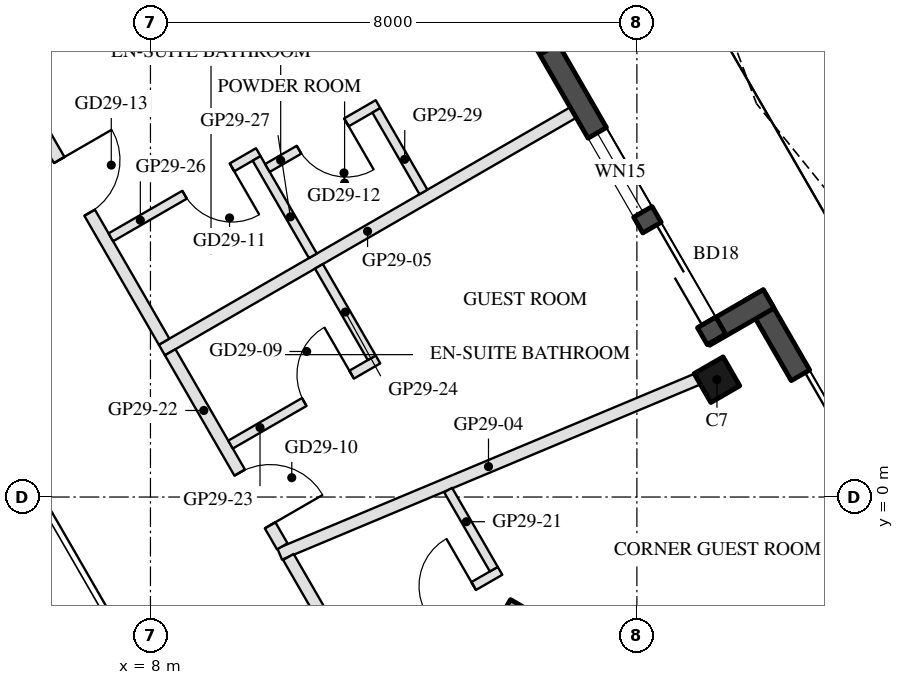
"""IFC4 building model, lengths in metres.
Left out: names, types, materials, properties, quantities, classifications, styles, units other than length and angle.
Written with IfcOpenShell. Run it as: python <this file> out.ifc"""

import sys

from ifc_helpers import new_model, si_unit, direction, frame, frame_2d, origin, origin_2d, place, context, subcontext, project, spatial, rectangle, hollow_rectangle, extrude, boolean, halfspace, element, fill, save


model = new_model("IFC4")
c1 = context("Model", 3, precision=1e-05, world=origin(), true_north=direction((0.0, 1.0)))
c2 = subcontext(c1, "Body", "Model", "MODEL_VIEW")
j1 = project(units=[si_unit("LENGTHUNIT", "METRE"), si_unit("PLANEANGLEUNIT", "RADIAN")], contexts=[c1])
p1 = place(None, origin())
s1 = spatial("IfcSite", under=j1, at=p1, CompositionType="ELEMENT")
p2 = place(p1, origin())
s2 = spatial("IfcBuilding", under=s1, at=p2, CompositionType="ELEMENT")
p3 = place(p2, frame((0.0, 0.0, 294.8)))
s3 = spatial("IfcBuildingStorey", under=s2, at=p3, CompositionType="ELEMENT", Elevation=294.8)
p4 = place(p3, frame((17.317, 1.93, 0.0), z_axis=(0.0, 0.0, 1.0), x_axis=(-0.5, 0.866025403784, 0.0)))
e1 = element("IfcColumn", 1, at=p4, inside=s3, PredefinedType="COLUMN", context=c2, shape_type="SweptSolid", body=[
    boolean("DIFFERENCE", extrude(hollow_rectangle(XDim=0.55, YDim=0.55, WallThickness=0.025, at=origin_2d()), origin(), (0.0, 0.0, 1.0), 3.7), halfspace(frame((0.0, 0.0, 3.666), z_axis=(0.0, 0.0, 1.0), x_axis=(1.0, 0.0, 0.0)), False)),
])
p5 = place(p3, frame((23.205, -5.819, 0.0), z_axis=(0.0, 0.0, 1.0), x_axis=(-0.500010118922, 0.866019561543, 0.0)))
e2 = element("IfcWall", 2, at=p5, inside=s3, PredefinedType="SOLIDWALL", context=c2, shape_type="SweptSolid", body=[
    extrude(rectangle(XDim=10.554, YDim=0.35, at=frame_2d((5.277, 0.0))), origin(), (0.0, 0.0, 1.0), 3.55),
])
p6 = place(p5, frame((0.566, 0.0, 0.3)))
e3 = element("IfcOpeningElement", 3, at=p6, cuts=e2, PredefinedType="OPENING", context=c2, shape_type="SweptSolid", body=[
    extrude(rectangle(XDim=1.4, YDim=2.65, at=frame_2d((0.7, 1.325))), frame((0.0, 0.185, 0.0), z_axis=(0.0, -1.0, 0.0), x_axis=(1.0, 0.0, 0.0)), (0.0, 0.0, 1.0), 0.37),
])
p7 = place(p5, frame((6.63, 0.0, 0.0)))
e4 = element("IfcOpeningElement", 4, at=p7, cuts=e2, PredefinedType="OPENING", context=c2, shape_type="SweptSolid", body=[
    extrude(rectangle(XDim=2.4, YDim=2.4, at=frame_2d((1.2, 1.2))), frame((0.0, 0.185, 0.0), z_axis=(0.0, -1.0, 0.0), x_axis=(1.0, 0.0, 0.0)), (0.0, 0.0, 1.0), 0.37),
])
p8 = place(p5, frame((3.292, 0.0, 0.3)))
e5 = element("IfcOpeningElement", 5, at=p8, cuts=e2, PredefinedType="OPENING", context=c2, shape_type="SweptSolid", body=[
    extrude(rectangle(XDim=3.0, YDim=2.65, at=frame_2d((1.5, 1.325))), frame((0.0, 0.185, 0.0), z_axis=(0.0, -1.0, 0.0), x_axis=(1.0, 0.0, 0.0)), (0.0, 0.0, 1.0), 0.37),
])
p9 = place(p3, frame((18.167, 3.258, 0.0), z_axis=(0.0, 0.0, 1.0), x_axis=(-0.866005645448, -0.500034220881, 0.0)))
e6 = element("IfcWall", 6, at=p9, inside=s3, PredefinedType="SOLIDWALL", context=c2, shape_type="SweptSolid", body=[
    extrude(rectangle(XDim=1.22, YDim=0.35, at=frame_2d((0.61, 0.0))), origin(), (0.0, 0.0, 1.0), 3.55),
])
p10 = place(p3, frame((17.308, 2.595, 0.0), z_axis=(0.0, 0.0, 1.0), x_axis=(-0.500005339912, 0.866022320763, 0.0)))
e7 = element("IfcWall", 7, at=p10, inside=s3, PredefinedType="SOLIDWALL", context=c2, shape_type="SweptSolid", body=[
    extrude(rectangle(XDim=5.827, YDim=0.35, at=frame_2d((2.914, 0.0))), origin(), (0.0, 0.0, 1.0), 3.55),
])
p11 = place(p10, frame((0.32, 0.0, 0.0)))
e8 = element("IfcOpeningElement", 8, at=p11, cuts=e7, PredefinedType="OPENING", context=c2, shape_type="SweptSolid", body=[
    extrude(rectangle(XDim=1.8, YDim=2.4, at=frame_2d((0.9, 1.2))), frame((0.0, 0.185, 0.0), z_axis=(0.0, -1.0, 0.0), x_axis=(1.0, 0.0, 0.0)), (0.0, 0.0, 1.0), 0.37),
])
p12 = place(p10, frame((2.42, 0.0, 0.3)))
e9 = element("IfcOpeningElement", 9, at=p12, cuts=e7, PredefinedType="OPENING", context=c2, shape_type="SweptSolid", body=[
    extrude(rectangle(XDim=1.5, YDim=2.65, at=frame_2d((0.75, 1.325))), frame((0.0, 0.185, 0.0), z_axis=(0.0, -1.0, 0.0), x_axis=(1.0, 0.0, 0.0)), (0.0, 0.0, 1.0), 0.37),
])
p13 = place(p3, frame((14.342, 7.443, 0.0), z_axis=(0.0, 0.0, 1.0), x_axis=(0.866092288191, 0.499884134912, 0.0)))
e10 = element("IfcWall", 10, at=p13, inside=s3, PredefinedType="SOLIDWALL", context=c2, shape_type="SweptSolid", body=[
    extrude(rectangle(XDim=1.22, YDim=0.35, at=frame_2d((0.61, 0.0))), origin(), (0.0, 0.0, 1.0), 3.55),
])
p14 = place(p3, frame((13.797, -1.903, 0.0), z_axis=(0.0, 0.0, 1.0), x_axis=(0.866025449148, -0.499999921427, 0.0)))
e11 = element("IfcWall", 11, at=p14, inside=s3, PredefinedType="SHEAR", context=c2, shape_type="SweptSolid", body=[
    extrude(rectangle(XDim=11.222, YDim=0.5, at=frame_2d((5.611, 0.0))), origin(), (0.0, 0.0, 1.0), 3.5),
])
p15 = place(p3, frame((16.994, 1.939, 0.0), z_axis=(0.0, 0.0, 1.0), x_axis=(-0.922394541425, -0.386249025824, 0.0)))
e12 = element("IfcWall", 12, at=p15, inside=s3, PredefinedType="PARTITIONING", context=c2, shape_type="SweptSolid", body=[
    extrude(rectangle(XDim=7.447, YDim=0.2, at=frame_2d((3.723, 0.0))), origin(), (0.0, 0.0, 1.0), 3.05),
])
p16 = place(p3, frame((14.953, 6.324, 0.0), z_axis=(0.0, 0.0, 1.0), x_axis=(-0.866030491634, -0.499991187483, 0.0)))
e13 = element("IfcWall", 13, at=p16, inside=s3, PredefinedType="PARTITIONING", context=c2, shape_type="SweptSolid", body=[
    extrude(rectangle(XDim=7.812, YDim=0.2, at=frame_2d((3.906, 0.0))), origin(), (0.0, 0.0, 1.0), 3.1),
])
p17 = place(p3, frame((10.269, -0.986, 0.0), z_axis=(0.0, 0.0, 1.0), x_axis=(0.50004472278, -0.865999581536, 0.0)))
e14 = element("IfcWall", 14, at=p17, inside=s3, PredefinedType="PARTITIONING", context=c2, shape_type="SweptSolid", body=[
    extrude(rectangle(XDim=4.0, YDim=0.2, at=frame_2d((2.0, 0.0))), origin(), (0.0, 0.0, 1.0), 3.05),
])
p18 = place(p17, frame((2.463, 0.0, 0.0)))
e15 = element("IfcOpeningElement", 15, at=p18, cuts=e14, PredefinedType="OPENING", context=c2, shape_type="SweptSolid", body=[
    extrude(rectangle(XDim=1.0, YDim=2.1, at=frame_2d((0.5, 1.05))), frame((0.0, 0.11, 0.0), z_axis=(0.0, -1.0, 0.0), x_axis=(1.0, 0.0, 0.0)), (0.0, 0.0, 1.0), 0.22),
])
p19 = place(p3, frame((11.324, -2.614, 0.0), z_axis=(0.0, 0.0, 1.0), x_axis=(0.866034573852, 0.49998411664, 0.0)))
e16 = element("IfcWall", 16, at=p19, inside=s3, PredefinedType="PARTITIONING", context=c2, shape_type="SweptSolid", body=[
    extrude(rectangle(XDim=2.8, YDim=0.15, at=frame_2d((1.4, 0.0))), origin(), (0.0, 0.0, 1.0), 3.55),
])
p20 = place(p19, frame((1.4, 0.0, 0.0)))
e17 = element("IfcOpeningElement", 17, at=p20, cuts=e16, PredefinedType="OPENING", context=c2, shape_type="SweptSolid", body=[
    extrude(rectangle(XDim=0.9, YDim=2.1, at=frame_2d((0.45, 1.05))), frame((0.0, 0.085, 0.0), z_axis=(0.0, -1.0, 0.0), x_axis=(1.0, 0.0, 0.0)), (0.0, 0.0, 1.0), 0.17),
])
p21 = place(p3, frame((13.646, -1.187, 0.0), z_axis=(0.0, 0.0, 1.0), x_axis=(-0.499985098601, 0.86603400694, 0.0)))
e18 = element("IfcWall", 18, at=p21, inside=s3, PredefinedType="PARTITIONING", context=c2, shape_type="SweptSolid", body=[
    extrude(rectangle(XDim=1.502, YDim=0.15, at=frame_2d((0.751, 0.0))), origin(), (0.0, 0.0, 1.0), 3.05),
])
p22 = place(p3, frame((8.325, 2.381, 0.0), z_axis=(0.0, 0.0, 1.0), x_axis=(0.499949858301, -0.866054351173, 0.0)))
e19 = element("IfcWall", 19, at=p22, inside=s3, PredefinedType="PARTITIONING", context=c2, shape_type="SweptSolid", body=[
    extrude(rectangle(XDim=3.687, YDim=0.2, at=frame_2d((1.843, 0.0))), origin(), (0.0, 0.0, 1.0), 3.05),
])
p23 = place(p22, frame((2.286, 0.0, 0.0)))
e20 = element("IfcOpeningElement", 20, at=p23, cuts=e19, PredefinedType="OPENING", context=c2, shape_type="SweptSolid", body=[
    extrude(rectangle(XDim=1.0, YDim=2.1, at=frame_2d((0.5, 1.05))), frame((0.0, 0.11, 0.0), z_axis=(0.0, -1.0, 0.0), x_axis=(1.0, 0.0, 0.0)), (0.0, 0.0, 1.0), 0.22),
])
p24 = place(p3, frame((9.317, 0.863, 0.0), z_axis=(0.0, 0.0, 1.0), x_axis=(0.865996816683, 0.500049511043, 0.0)))
e21 = element("IfcWall", 21, at=p24, inside=s3, PredefinedType="PARTITIONING", context=c2, shape_type="SweptSolid", body=[
    extrude(rectangle(XDim=2.8, YDim=0.15, at=frame_2d((1.4, 0.0))), origin(), (0.0, 0.0, 1.0), 3.55),
])
p25 = place(p24, frame((1.4, 0.0, 0.0)))
e22 = element("IfcOpeningElement", 22, at=p25, cuts=e21, PredefinedType="OPENING", context=c2, shape_type="SweptSolid", body=[
    extrude(rectangle(XDim=0.9, YDim=2.1, at=frame_2d((0.45, 1.05))), frame((0.0, 0.085, 0.0), z_axis=(0.0, -1.0, 0.0), x_axis=(1.0, 0.0, 0.0)), (0.0, 0.0, 1.0), 0.17),
])
p26 = place(p3, frame((11.639, 2.29, 0.0), z_axis=(0.0, 0.0, 1.0), x_axis=(-0.500115958453, 0.865958444789, 0.0)))
e23 = element("IfcWall", 23, at=p26, inside=s3, PredefinedType="PARTITIONING", context=c2, shape_type="SweptSolid", body=[
    extrude(rectangle(XDim=1.736, YDim=0.15, at=frame_2d((0.868, 0.0))), origin(), (0.0, 0.0, 1.0), 3.05),
])
p27 = place(p3, frame((2.281, 12.85, 0.0), z_axis=(0.0, 0.0, 1.0), x_axis=(0.500002143212, -0.866024166397, 0.0)))
e24 = element("IfcWall", 24, at=p27, inside=s3, PredefinedType="PARTITIONING", context=c2, shape_type="SweptSolid", body=[
    extrude(rectangle(XDim=11.888, YDim=0.2, at=frame_2d((5.944, 0.0))), origin(), (0.0, 0.0, 1.0), 3.05),
])
p28 = place(p27, frame((8.438, 0.0, 0.0)))
e25 = element("IfcOpeningElement", 25, at=p28, cuts=e24, PredefinedType="OPENING", context=c2, shape_type="SweptSolid", body=[
    extrude(rectangle(XDim=1.0, YDim=2.1, at=frame_2d((0.5, 1.05))), frame((0.0, 0.11, 0.0), z_axis=(0.0, -1.0, 0.0), x_axis=(1.0, 0.0, 0.0)), (0.0, 0.0, 1.0), 0.22),
])
p29 = place(p3, frame((9.774, 5.672, 0.0), z_axis=(0.0, 0.0, 1.0), x_axis=(-0.866056369097, -0.49994636267, 0.0)))
e26 = element("IfcWall", 26, at=p29, inside=s3, PredefinedType="PARTITIONING", context=c2, shape_type="SweptSolid", body=[
    extrude(rectangle(XDim=2.8, YDim=0.15, at=frame_2d((1.4, 0.0))), origin(), (0.0, 0.0, 1.0), 3.05),
])
p30 = place(p29, frame((0.5, 0.0, 0.0)))
e27 = element("IfcOpeningElement", 27, at=p30, cuts=e26, PredefinedType="OPENING", context=c2, shape_type="SweptSolid", body=[
    extrude(rectangle(XDim=0.9, YDim=2.1, at=frame_2d((0.45, 1.05))), frame((0.0, 0.085, 0.0), z_axis=(0.0, -1.0, 0.0), x_axis=(1.0, 0.0, 0.0)), (0.0, 0.0, 1.0), 0.17),
])
p31 = place(p3, frame((10.671, 3.967, 0.0), z_axis=(0.0, 0.0, 1.0), x_axis=(-0.500042316284, 0.866000971088, 0.0)))
e28 = element("IfcWall", 28, at=p31, inside=s3, PredefinedType="PARTITIONING", context=c2, shape_type="SweptSolid", body=[
    extrude(rectangle(XDim=1.85, YDim=0.15, at=frame_2d((0.925, 0.0))), origin(), (0.0, 0.0, 1.0), 3.05),
])
p32 = place(p3, frame((11.742, 6.462, 0.0), z_axis=(0.0, 0.0, 1.0), x_axis=(-0.866009402589, -0.500027713859, 0.0)))
e29 = element("IfcWall", 29, at=p32, inside=s3, PredefinedType="PARTITIONING", context=c2, shape_type="SweptSolid", body=[
    extrude(rectangle(XDim=2.1, YDim=0.15, at=frame_2d((1.05, 0.0))), origin(), (0.0, 0.0, 1.0), 3.55),
])
p33 = place(p32, frame((0.6, 0.0, 0.0)))
e30 = element("IfcOpeningElement", 30, at=p33, cuts=e29, PredefinedType="OPENING", context=c2, shape_type="SweptSolid", body=[
    extrude(rectangle(XDim=0.9, YDim=2.1, at=frame_2d((0.45, 1.05))), frame((0.0, 0.085, 0.0), z_axis=(0.0, -1.0, 0.0), x_axis=(1.0, 0.0, 0.0)), (0.0, 0.0, 1.0), 0.17),
])
p34 = place(p3, frame((12.49, 5.017, 0.0), z_axis=(0.0, 0.0, 1.0), x_axis=(-0.499967891604, 0.866043940782, 0.0)))
e31 = element("IfcWall", 31, at=p34, inside=s3, PredefinedType="PARTITIONING", context=c2, shape_type="SweptSolid", body=[
    extrude(rectangle(XDim=1.55, YDim=0.15, at=frame_2d((0.775, 0.0))), origin(), (0.0, 0.0, 1.0), 3.55),
])
p35 = place(p7, frame((2.4, 0.0, 0.0), z_axis=(0.0, 0.0, 1.0), x_axis=(-1.0, 0.0, 0.0)))
e32 = element("IfcDoor", 32, at=p35, inside=s3, OperationType="SLIDING_TO_LEFT", PredefinedType="DOOR", context=c2, shape_type="SweptSolid", body=[
    extrude(rectangle(XDim=2.4, YDim=2.4, at=frame_2d((1.2, 1.2))), frame((0.0, 0.025, 0.0), z_axis=(0.0, -1.0, 0.0), x_axis=(1.0, 0.0, 0.0)), (0.0, 0.0, 1.0), 0.05),
])
fill(e4, e32)
p36 = place(p11, frame((1.8, 0.0, 0.0), z_axis=(0.0, 0.0, 1.0), x_axis=(-1.0, 0.0, 0.0)))
e33 = element("IfcDoor", 33, at=p36, inside=s3, OperationType="SLIDING_TO_LEFT", PredefinedType="DOOR", context=c2, shape_type="SweptSolid", body=[
    extrude(rectangle(XDim=1.8, YDim=2.4, at=frame_2d((0.9, 1.2))), frame((0.0, 0.025, 0.0), z_axis=(0.0, -1.0, 0.0), x_axis=(1.0, 0.0, 0.0)), (0.0, 0.0, 1.0), 0.05),
])
fill(e8, e33)
p37 = place(p12, origin())
e34 = element("IfcWindow", 34, at=p37, inside=s3, PartitioningType="SINGLE_PANEL", PredefinedType="WINDOW", context=c2, shape_type="SweptSolid", body=[
    extrude(rectangle(XDim=1.5, YDim=2.65, at=frame_2d((0.75, 1.325))), frame((0.0, 0.03, 0.0), z_axis=(0.0, -1.0, 0.0), x_axis=(1.0, 0.0, 0.0)), (0.0, 0.0, 1.0), 0.06),
])
fill(e9, e34)
p38 = place(p20, origin())
e35 = element("IfcDoor", 35, at=p38, inside=s3, OperationType="SINGLE_SWING_RIGHT", PredefinedType="DOOR", context=c2, shape_type="SweptSolid", body=[
    extrude(rectangle(XDim=0.9, YDim=2.1, at=frame_2d((0.45, 1.05))), frame((0.0, 0.025, 0.0), z_axis=(0.0, -1.0, 0.0), x_axis=(1.0, 0.0, 0.0)), (0.0, 0.0, 1.0), 0.05),
])
fill(e17, e35)
p39 = place(p25, origin())
e36 = element("IfcDoor", 36, at=p39, inside=s3, OperationType="SINGLE_SWING_RIGHT", PredefinedType="DOOR", context=c2, shape_type="SweptSolid", body=[
    extrude(rectangle(XDim=0.9, YDim=2.1, at=frame_2d((0.45, 1.05))), frame((0.0, 0.025, 0.0), z_axis=(0.0, -1.0, 0.0), x_axis=(1.0, 0.0, 0.0)), (0.0, 0.0, 1.0), 0.05),
])
fill(e22, e36)
p40 = place(p23, origin())
e37 = element("IfcDoor", 37, at=p40, inside=s3, OperationType="SINGLE_SWING_RIGHT", PredefinedType="DOOR", context=c2, shape_type="SweptSolid", body=[
    extrude(rectangle(XDim=1.0, YDim=2.1, at=frame_2d((0.5, 1.05))), frame((0.0, 0.025, 0.0), z_axis=(0.0, -1.0, 0.0), x_axis=(1.0, 0.0, 0.0)), (0.0, 0.0, 1.0), 0.05),
])
fill(e20, e37)
p41 = place(p30, origin())
e38 = element("IfcDoor", 38, at=p41, inside=s3, OperationType="SINGLE_SWING_LEFT", PredefinedType="DOOR", context=c2, shape_type="SweptSolid", body=[
    extrude(rectangle(XDim=0.9, YDim=2.1, at=frame_2d((0.45, 1.05))), frame((0.0, 0.025, 0.0), z_axis=(0.0, -1.0, 0.0), x_axis=(1.0, 0.0, 0.0)), (0.0, 0.0, 1.0), 0.05),
])
fill(e27, e38)
p42 = place(p33, origin())
e39 = element("IfcDoor", 39, at=p42, inside=s3, OperationType="SINGLE_SWING_LEFT", PredefinedType="DOOR", context=c2, shape_type="SweptSolid", body=[
    extrude(rectangle(XDim=0.9, YDim=2.1, at=frame_2d((0.45, 1.05))), frame((0.0, 0.025, 0.0), z_axis=(0.0, -1.0, 0.0), x_axis=(1.0, 0.0, 0.0)), (0.0, 0.0, 1.0), 0.05),
])
fill(e30, e39)
p43 = place(p28, origin())
e40 = element("IfcDoor", 40, at=p43, inside=s3, OperationType="SINGLE_SWING_LEFT", PredefinedType="DOOR", context=c2, shape_type="SweptSolid", body=[
    extrude(rectangle(XDim=1.0, YDim=2.1, at=frame_2d((0.5, 1.05))), frame((0.0, 0.025, 0.0), z_axis=(0.0, -1.0, 0.0), x_axis=(1.0, 0.0, 0.0)), (0.0, 0.0, 1.0), 0.05),
])
fill(e25, e40)
save(model, sys.argv[1])
